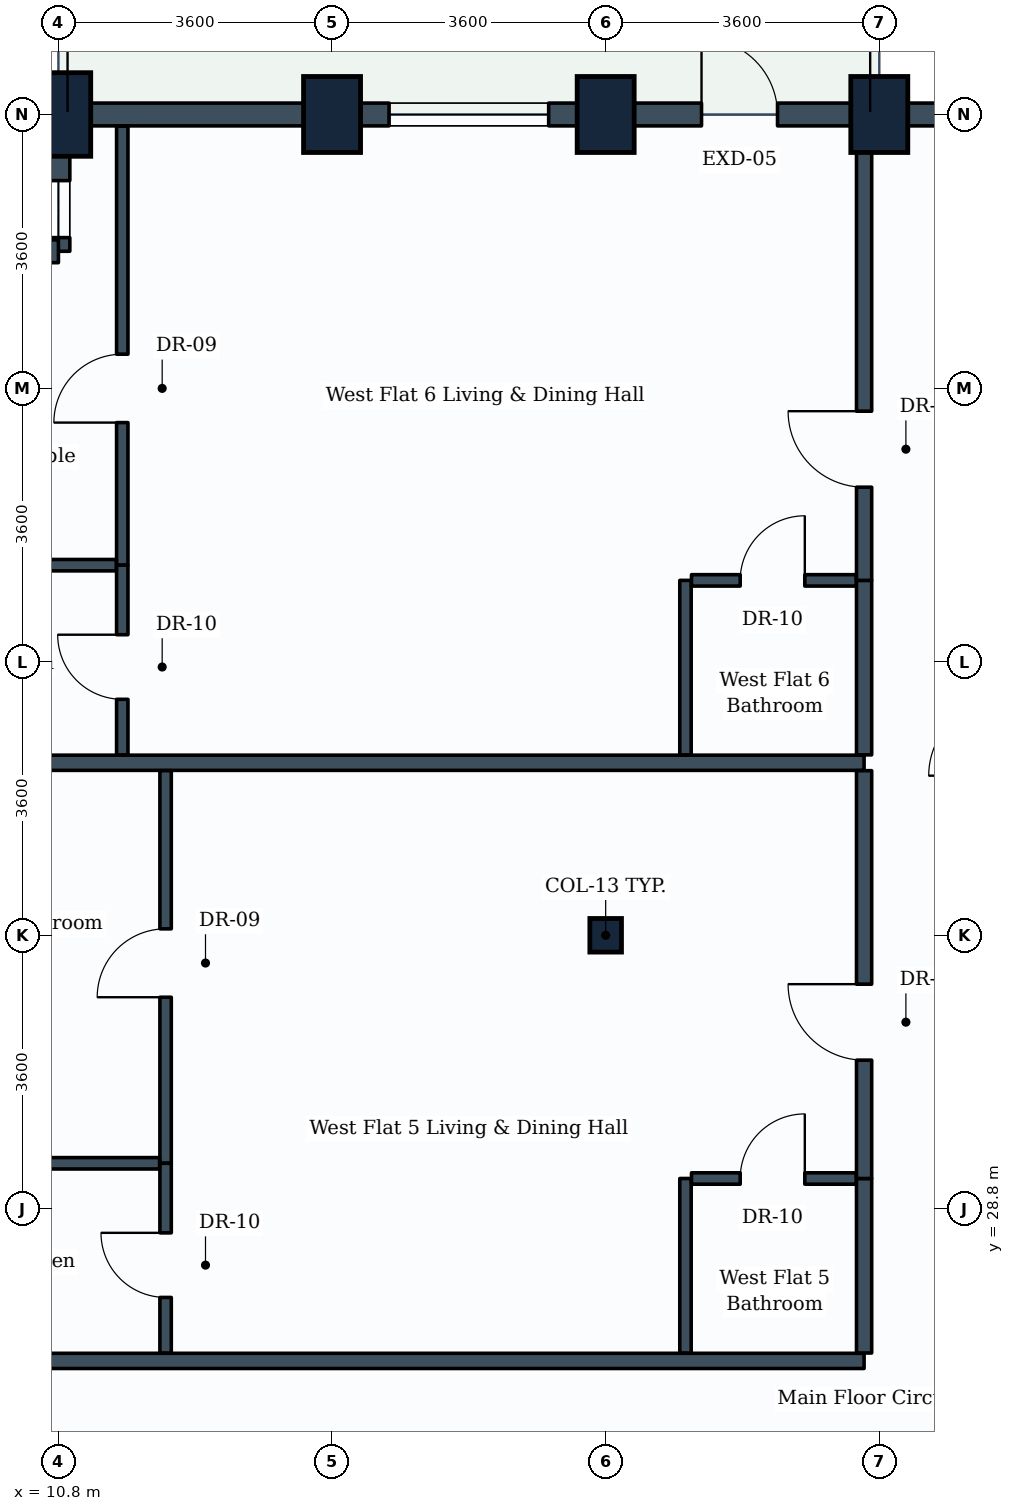
"""IFC4 building model, lengths in metres.
Left out: names, types, materials, properties, quantities, classifications, styles, units other than length and angle.
Written with IfcOpenShell. Run it as: python <this file> out.ifc"""

import sys

from ifc_helpers import new_model, si_unit, direction, frame, frame_2d, origin, origin_2d, place, context, subcontext, project, spatial, rectangle, i_section, extrude, element, fill, save


model = new_model("IFC4")
c1 = context("Model", 3, precision=1e-05, world=origin(), true_north=direction((0.0, 1.0)))
c2 = subcontext(c1, "Body", "Model", "MODEL_VIEW")
j1 = project(units=[si_unit("LENGTHUNIT", "METRE"), si_unit("PLANEANGLEUNIT", "RADIAN")], contexts=[c1])
p1 = place(None, origin())
s1 = spatial("IfcSite", under=j1, at=p1, CompositionType="ELEMENT")
p2 = place(p1, origin())
s2 = spatial("IfcBuilding", under=s1, at=p2, CompositionType="ELEMENT")
p3 = place(p2, frame((0.0, 0.0, 131.4)))
s3 = spatial("IfcBuildingStorey", under=s2, at=p3, CompositionType="ELEMENT", Elevation=131.4)
p4 = place(p3, frame((10.8, 43.2, 0.0), z_axis=(0.0, 0.0, 1.0), x_axis=(1.0, 0.0, 0.0)))
e1 = element("IfcColumn", 1, at=p4, inside=s3, PredefinedType="COLUMN", context=c2, shape_type="SweptSolid", body=[
    extrude(rectangle(XDim=0.85, YDim=1.1, at=origin_2d()), origin(), (0.0, 0.0, 1.0), 3.8),
])
p5 = place(p3, frame((14.4, 43.2, 0.0), z_axis=(0.0, 0.0, 1.0), x_axis=(1.0, 0.0, 0.0)))
e2 = element("IfcColumn", 2, at=p5, inside=s3, PredefinedType="COLUMN", context=c2, shape_type="SweptSolid", body=[
    extrude(rectangle(XDim=0.75, YDim=1.0, at=origin_2d()), origin(), (0.0, 0.0, 1.0), 3.8),
])
p6 = place(p3, frame((18.0, 32.4, 0.0), z_axis=(0.0, 0.0, 1.0), x_axis=(1.0, 0.0, 0.0)))
e3 = element("IfcColumn", 3, at=p6, inside=s3, PredefinedType="COLUMN", context=c2, shape_type="SweptSolid", body=[
    extrude(i_section(OverallWidth=0.416, OverallDepth=0.442, WebThickness=0.025, FlangeThickness=0.041, FilletRadius=0.015, at=origin_2d()), origin(), (0.0, 0.0, 1.0), 3.8),
])
for number, where, z_axis, x_axis in (
    (4, (18.0, 43.2, 0.0), (0.0, 0.0, 1.0), (1.0, 0.0, 0.0)),
    (5, (21.6, 43.2, 0.0), (0.0, 0.0, 1.0), (1.0, 0.0, 0.0)),
):
    element("IfcColumn", number, at=place(p3, frame(where, z_axis=z_axis, x_axis=x_axis)), inside=s3, PredefinedType="COLUMN", context=c2, shape_type="SweptSolid", body=[
        extrude(rectangle(XDim=0.75, YDim=1.0, at=origin_2d()), origin(), (0.0, 0.0, 1.0), 3.8),
    ])
p7 = place(p3, frame((21.6, 43.2, 0.0), z_axis=(0.0, 0.0, 1.0), x_axis=(1.0, 0.0, 0.0)))
e6 = element("IfcWall", 6, at=p7, inside=s3, PredefinedType="STANDARD", context=c2, shape_type="SweptSolid", body=[
    extrude(rectangle(XDim=3.6, YDim=0.3, at=frame_2d((1.8, 0.0))), origin(), (0.0, 0.0, 1.0), 2.93),
])
p8 = place(p3, frame((18.0, 43.2, 0.0), z_axis=(0.0, 0.0, 1.0), x_axis=(1.0, 0.0, 0.0)))
e7 = element("IfcWall", 7, at=p8, inside=s3, PredefinedType="STANDARD", context=c2, shape_type="SweptSolid", body=[
    extrude(rectangle(XDim=3.6, YDim=0.3, at=frame_2d((1.8, 0.0))), origin(), (0.0, 0.0, 1.0), 2.93),
])
p9 = place(p8, frame((1.261, 0.0, 0.0)))
e8 = element("IfcOpeningElement", 8, at=p9, cuts=e7, PredefinedType="OPENING", context=c2, shape_type="SweptSolid", body=[
    extrude(rectangle(XDim=1.0, YDim=2.1, at=frame_2d((0.5, 1.05))), frame((0.0, 0.16, 0.0), z_axis=(0.0, -1.0, 0.0), x_axis=(1.0, 0.0, 0.0)), (0.0, 0.0, 1.0), 0.32),
])
p10 = place(p3, frame((14.4, 43.2, 0.0), z_axis=(0.0, 0.0, 1.0), x_axis=(1.0, 0.0, 0.0)))
e9 = element("IfcWall", 9, at=p10, inside=s3, PredefinedType="STANDARD", context=c2, shape_type="SweptSolid", body=[
    extrude(rectangle(XDim=3.6, YDim=0.3, at=frame_2d((1.8, 0.0))), origin(), (0.0, 0.0, 1.0), 2.93),
])
p11 = place(p10, frame((0.75, 0.0, 0.85)))
e10 = element("IfcOpeningElement", 10, at=p11, cuts=e9, PredefinedType="OPENING", context=c2, shape_type="SweptSolid", body=[
    extrude(rectangle(XDim=2.1, YDim=1.35, at=frame_2d((1.05, 0.675))), frame((0.0, 0.16, 0.0), z_axis=(0.0, -1.0, 0.0), x_axis=(1.0, 0.0, 0.0)), (0.0, 0.0, 1.0), 0.32),
])
p12 = place(p3, frame((10.8, 43.2, 0.0), z_axis=(0.0, 0.0, 1.0), x_axis=(1.0, 0.0, 0.0)))
e11 = element("IfcWall", 11, at=p12, inside=s3, PredefinedType="STANDARD", context=c2, shape_type="SweptSolid", body=[
    extrude(rectangle(XDim=3.6, YDim=0.3, at=frame_2d((1.8, 0.0))), origin(), (0.0, 0.0, 1.0), 2.93),
])
p13 = place(p3, frame((10.8, 41.4, 0.0), z_axis=(0.0, 0.0, 1.0), x_axis=(0.0, 1.0, 0.0)))
e12 = element("IfcWall", 12, at=p13, inside=s3, PredefinedType="STANDARD", context=c2, shape_type="SweptSolid", body=[
    extrude(rectangle(XDim=1.8, YDim=0.3, at=frame_2d((0.9, 0.0))), origin(), (0.0, 0.0, 1.0), 2.93),
])
p14 = place(p13, frame((0.18, 0.0, 0.85)))
e13 = element("IfcOpeningElement", 13, at=p14, cuts=e12, PredefinedType="OPENING", context=c2, shape_type="SweptSolid", body=[
    extrude(rectangle(XDim=0.75, YDim=1.05, at=frame_2d((0.375, 0.525))), frame((0.0, 0.16, 0.0), z_axis=(0.0, -1.0, 0.0), x_axis=(1.0, 0.0, 0.0)), (0.0, 0.0, 1.0), 0.32),
])
p15 = place(p3, frame((9.0, 41.4, 0.0), z_axis=(0.0, 0.0, 1.0), x_axis=(1.0, 0.0, 0.0)))
e14 = element("IfcWall", 14, at=p15, inside=s3, PredefinedType="STANDARD", context=c2, shape_type="SweptSolid", body=[
    extrude(rectangle(XDim=1.8, YDim=0.3, at=frame_2d((0.9, 0.0))), origin(), (0.0, 0.0, 1.0), 3.535),
])
for number, where, z_axis, x_axis in (
    (15, (7.354, 26.8, 0.0), (0.0, 0.0, 1.0), (1.0, 0.0, 0.0)),
    (16, (7.354, 34.67, 0.0), (0.0, 0.0, 1.0), (1.0, 0.0, 0.0)),
):
    element("IfcWall", number, at=place(p3, frame(where, z_axis=z_axis, x_axis=x_axis)), inside=s3, PredefinedType="PARTITIONING", context=c2, shape_type="SweptSolid", body=[
        extrude(rectangle(XDim=14.046, YDim=0.2, at=frame_2d((7.023, 0.0))), origin(), (0.0, 0.0, 1.0), 2.93),
    ])
p16 = place(p3, frame((21.4, 26.904, 0.0), z_axis=(0.0, 0.0, 1.0), x_axis=(0.0, 1.0, 0.0)))
e17 = element("IfcWall", 17, at=p16, inside=s3, PredefinedType="PARTITIONING", context=c2, shape_type="SweptSolid", body=[
    extrude(rectangle(XDim=2.296, YDim=0.2, at=frame_2d((1.148, 0.0))), origin(), (0.0, 0.0, 1.0), 3.13),
])
p17 = place(p3, frame((19.05, 26.904, 0.0), z_axis=(0.0, 0.0, 1.0), x_axis=(0.0, 1.0, 0.0)))
e18 = element("IfcWall", 18, at=p17, inside=s3, PredefinedType="PARTITIONING", context=c2, shape_type="SweptSolid", body=[
    extrude(rectangle(XDim=2.296, YDim=0.15, at=frame_2d((1.148, 0.0))), origin(), (0.0, 0.0, 1.0), 3.17),
])
p18 = place(p3, frame((19.129, 29.2, 0.0), z_axis=(0.0, 0.0, 1.0), x_axis=(1.0, 0.0, 0.0)))
e19 = element("IfcWall", 19, at=p18, inside=s3, PredefinedType="PARTITIONING", context=c2, shape_type="SweptSolid", body=[
    extrude(rectangle(XDim=2.167, YDim=0.15, at=frame_2d((1.083, 0.0))), origin(), (0.0, 0.0, 1.0), 3.535),
])
p19 = place(p18, frame((0.641, 0.0, 0.0)))
e20 = element("IfcOpeningElement", 20, at=p19, cuts=e19, PredefinedType="OPENING", context=c2, shape_type="SweptSolid", body=[
    extrude(rectangle(XDim=0.85, YDim=2.1, at=frame_2d((0.425, 1.05))), frame((0.0, 0.085, 0.0), z_axis=(0.0, -1.0, 0.0), x_axis=(1.0, 0.0, 0.0)), (0.0, 0.0, 1.0), 0.17),
])
p20 = place(p3, frame((21.4, 29.2, 0.0), z_axis=(0.0, 0.0, 1.0), x_axis=(0.0, 1.0, 0.0)))
e21 = element("IfcWall", 21, at=p20, inside=s3, PredefinedType="PARTITIONING", context=c2, shape_type="SweptSolid", body=[
    extrude(rectangle(XDim=5.366, YDim=0.2, at=frame_2d((2.683, 0.0))), origin(), (0.0, 0.0, 1.0), 3.13),
])
p21 = place(p20, frame((1.557, 0.0, 0.0)))
e22 = element("IfcOpeningElement", 22, at=p21, cuts=e21, PredefinedType="OPENING", context=c2, shape_type="SweptSolid", body=[
    extrude(rectangle(XDim=1.0, YDim=2.1, at=frame_2d((0.5, 1.05))), frame((0.0, 0.11, 0.0), z_axis=(0.0, -1.0, 0.0), x_axis=(1.0, 0.0, 0.0)), (0.0, 0.0, 1.0), 0.22),
])
p22 = place(p3, frame((12.21, 29.4, 0.0), z_axis=(0.0, 0.0, 1.0), x_axis=(0.0, 1.0, 0.0)))
e23 = element("IfcWall", 23, at=p22, inside=s3, PredefinedType="PARTITIONING", context=c2, shape_type="SweptSolid", body=[
    extrude(rectangle(XDim=5.166, YDim=0.15, at=frame_2d((2.583, 0.0))), origin(), (0.0, 0.0, 1.0), 3.18),
])
p23 = place(p22, frame((2.185, 0.0, 0.0)))
e24 = element("IfcOpeningElement", 24, at=p23, cuts=e23, PredefinedType="OPENING", context=c2, shape_type="SweptSolid", body=[
    extrude(rectangle(XDim=0.9, YDim=2.1, at=frame_2d((0.45, 1.05))), frame((0.0, 0.085, 0.0), z_axis=(0.0, -1.0, 0.0), x_axis=(1.0, 0.0, 0.0)), (0.0, 0.0, 1.0), 0.17),
])
p24 = place(p3, frame((12.21, 26.904, 0.0), z_axis=(0.0, 0.0, 1.0), x_axis=(0.0, 1.0, 0.0)))
e25 = element("IfcWall", 25, at=p24, inside=s3, PredefinedType="PARTITIONING", context=c2, shape_type="SweptSolid", body=[
    extrude(rectangle(XDim=2.496, YDim=0.15, at=frame_2d((1.248, 0.0))), origin(), (0.0, 0.0, 1.0), 3.17),
])
p25 = place(p24, frame((0.731, 0.0, 0.0)))
e26 = element("IfcOpeningElement", 26, at=p25, cuts=e25, PredefinedType="OPENING", context=c2, shape_type="SweptSolid", body=[
    extrude(rectangle(XDim=0.85, YDim=2.1, at=frame_2d((0.425, 1.05))), frame((0.0, 0.085, 0.0), z_axis=(0.0, -1.0, 0.0), x_axis=(1.0, 0.0, 0.0)), (0.0, 0.0, 1.0), 0.17),
])
p26 = place(p3, frame((7.354, 29.4, 0.0), z_axis=(0.0, 0.0, 1.0), x_axis=(1.0, 0.0, 0.0)))
e27 = element("IfcWall", 27, at=p26, inside=s3, PredefinedType="PARTITIONING", context=c2, shape_type="SweptSolid", body=[
    extrude(rectangle(XDim=4.777, YDim=0.15, at=frame_2d((2.389, 0.0))), origin(), (0.0, 0.0, 1.0), 2.93),
])
p27 = place(p3, frame((21.4, 34.774, 0.0), z_axis=(0.0, 0.0, 1.0), x_axis=(0.0, 1.0, 0.0)))
e28 = element("IfcWall", 28, at=p27, inside=s3, PredefinedType="PARTITIONING", context=c2, shape_type="SweptSolid", body=[
    extrude(rectangle(XDim=2.296, YDim=0.2, at=frame_2d((1.148, 0.0))), origin(), (0.0, 0.0, 1.0), 3.17),
])
p28 = place(p3, frame((19.05, 34.774, 0.0), z_axis=(0.0, 0.0, 1.0), x_axis=(0.0, 1.0, 0.0)))
e29 = element("IfcWall", 29, at=p28, inside=s3, PredefinedType="PARTITIONING", context=c2, shape_type="SweptSolid", body=[
    extrude(rectangle(XDim=2.296, YDim=0.15, at=frame_2d((1.148, 0.0))), origin(), (0.0, 0.0, 1.0), 3.17),
])
p29 = place(p3, frame((19.129, 37.07, 0.0), z_axis=(0.0, 0.0, 1.0), x_axis=(1.0, 0.0, 0.0)))
e30 = element("IfcWall", 30, at=p29, inside=s3, PredefinedType="PARTITIONING", context=c2, shape_type="SweptSolid", body=[
    extrude(rectangle(XDim=2.167, YDim=0.15, at=frame_2d((1.083, 0.0))), origin(), (0.0, 0.0, 1.0), 3.535),
])
p30 = place(p29, frame((0.641, 0.0, 0.0)))
e31 = element("IfcOpeningElement", 31, at=p30, cuts=e30, PredefinedType="OPENING", context=c2, shape_type="SweptSolid", body=[
    extrude(rectangle(XDim=0.85, YDim=2.1, at=frame_2d((0.425, 1.05))), frame((0.0, 0.085, 0.0), z_axis=(0.0, -1.0, 0.0), x_axis=(1.0, 0.0, 0.0)), (0.0, 0.0, 1.0), 0.17),
])
p31 = place(p3, frame((21.4, 37.07, 0.0), z_axis=(0.0, 0.0, 1.0), x_axis=(0.0, 1.0, 0.0)))
e32 = element("IfcWall", 32, at=p31, inside=s3, PredefinedType="PARTITIONING", context=c2, shape_type="SweptSolid", body=[
    extrude(rectangle(XDim=5.976, YDim=0.2, at=frame_2d((2.988, 0.0))), origin(), (0.0, 0.0, 1.0), 2.93),
])
p32 = place(p31, frame((1.226, 0.0, 0.0)))
e33 = element("IfcOpeningElement", 33, at=p32, cuts=e32, PredefinedType="OPENING", context=c2, shape_type="SweptSolid", body=[
    extrude(rectangle(XDim=1.0, YDim=2.1, at=frame_2d((0.5, 1.05))), frame((0.0, 0.11, 0.0), z_axis=(0.0, -1.0, 0.0), x_axis=(1.0, 0.0, 0.0)), (0.0, 0.0, 1.0), 0.22),
])
p33 = place(p3, frame((11.64, 37.27, 0.0), z_axis=(0.0, 0.0, 1.0), x_axis=(0.0, 1.0, 0.0)))
e34 = element("IfcWall", 34, at=p33, inside=s3, PredefinedType="PARTITIONING", context=c2, shape_type="SweptSolid", body=[
    extrude(rectangle(XDim=5.776, YDim=0.15, at=frame_2d((2.888, 0.0))), origin(), (0.0, 0.0, 1.0), 2.93),
])
p34 = place(p33, frame((1.876, 0.0, 0.0)))
e35 = element("IfcOpeningElement", 35, at=p34, cuts=e34, PredefinedType="OPENING", context=c2, shape_type="SweptSolid", body=[
    extrude(rectangle(XDim=0.9, YDim=2.1, at=frame_2d((0.45, 1.05))), frame((0.0, 0.085, 0.0), z_axis=(0.0, -1.0, 0.0), x_axis=(1.0, 0.0, 0.0)), (0.0, 0.0, 1.0), 0.17),
])
p35 = place(p3, frame((11.64, 34.774, 0.0), z_axis=(0.0, 0.0, 1.0), x_axis=(0.0, 1.0, 0.0)))
e36 = element("IfcWall", 36, at=p35, inside=s3, PredefinedType="PARTITIONING", context=c2, shape_type="SweptSolid", body=[
    extrude(rectangle(XDim=2.496, YDim=0.15, at=frame_2d((1.248, 0.0))), origin(), (0.0, 0.0, 1.0), 3.17),
])
p36 = place(p35, frame((0.731, 0.0, 0.0)))
e37 = element("IfcOpeningElement", 37, at=p36, cuts=e36, PredefinedType="OPENING", context=c2, shape_type="SweptSolid", body=[
    extrude(rectangle(XDim=0.85, YDim=2.1, at=frame_2d((0.425, 1.05))), frame((0.0, 0.085, 0.0), z_axis=(0.0, -1.0, 0.0), x_axis=(1.0, 0.0, 0.0)), (0.0, 0.0, 1.0), 0.17),
])
p37 = place(p3, frame((7.354, 37.27, 0.0), z_axis=(0.0, 0.0, 1.0), x_axis=(1.0, 0.0, 0.0)))
e38 = element("IfcWall", 38, at=p37, inside=s3, PredefinedType="PARTITIONING", context=c2, shape_type="SweptSolid", body=[
    extrude(rectangle(XDim=4.207, YDim=0.15, at=frame_2d((2.104, 0.0))), origin(), (0.0, 0.0, 1.0), 2.93),
])
p38 = place(p9, origin())
e39 = element("IfcDoor", 39, at=p38, inside=s3, OperationType="SINGLE_SWING_LEFT", PredefinedType="DOOR", context=c2, shape_type="SweptSolid", body=[
    extrude(rectangle(XDim=1.0, YDim=2.1, at=frame_2d((0.5, 1.05))), frame((0.0, 0.025, 0.0), z_axis=(0.0, -1.0, 0.0), x_axis=(1.0, 0.0, 0.0)), (0.0, 0.0, 1.0), 0.05),
])
fill(e8, e39)
p39 = place(p11, origin())
e40 = element("IfcWindow", 40, at=p39, inside=s3, PartitioningType="SINGLE_PANEL", PredefinedType="WINDOW", context=c2, shape_type="SweptSolid", body=[
    extrude(rectangle(XDim=2.1, YDim=1.35, at=frame_2d((1.05, 0.675))), frame((0.0, 0.03, 0.0), z_axis=(0.0, -1.0, 0.0), x_axis=(1.0, 0.0, 0.0)), (0.0, 0.0, 1.0), 0.06),
])
fill(e10, e40)
p40 = place(p19, origin())
e41 = element("IfcDoor", 41, at=p40, inside=s3, OperationType="SINGLE_SWING_RIGHT", PredefinedType="DOOR", context=c2, shape_type="SweptSolid", body=[
    extrude(rectangle(XDim=0.85, YDim=2.1, at=frame_2d((0.425, 1.05))), frame((0.0, 0.025, 0.0), z_axis=(0.0, -1.0, 0.0), x_axis=(1.0, 0.0, 0.0)), (0.0, 0.0, 1.0), 0.05),
])
fill(e20, e41)
p41 = place(p21, origin())
e42 = element("IfcDoor", 42, at=p41, inside=s3, OperationType="SINGLE_SWING_RIGHT", PredefinedType="DOOR", context=c2, shape_type="SweptSolid", body=[
    extrude(rectangle(XDim=1.0, YDim=2.1, at=frame_2d((0.5, 1.05))), frame((0.0, 0.025, 0.0), z_axis=(0.0, -1.0, 0.0), x_axis=(1.0, 0.0, 0.0)), (0.0, 0.0, 1.0), 0.05),
])
fill(e22, e42)
p42 = place(p23, origin())
e43 = element("IfcDoor", 43, at=p42, inside=s3, OperationType="SINGLE_SWING_LEFT", PredefinedType="DOOR", context=c2, shape_type="SweptSolid", body=[
    extrude(rectangle(XDim=0.9, YDim=2.1, at=frame_2d((0.45, 1.05))), frame((0.0, 0.025, 0.0), z_axis=(0.0, -1.0, 0.0), x_axis=(1.0, 0.0, 0.0)), (0.0, 0.0, 1.0), 0.05),
])
fill(e24, e43)
p43 = place(p25, origin())
e44 = element("IfcDoor", 44, at=p43, inside=s3, OperationType="SINGLE_SWING_RIGHT", PredefinedType="DOOR", context=c2, shape_type="SweptSolid", body=[
    extrude(rectangle(XDim=0.85, YDim=2.1, at=frame_2d((0.425, 1.05))), frame((0.0, 0.025, 0.0), z_axis=(0.0, -1.0, 0.0), x_axis=(1.0, 0.0, 0.0)), (0.0, 0.0, 1.0), 0.05),
])
fill(e26, e44)
p44 = place(p30, origin())
e45 = element("IfcDoor", 45, at=p44, inside=s3, OperationType="SINGLE_SWING_RIGHT", PredefinedType="DOOR", context=c2, shape_type="SweptSolid", body=[
    extrude(rectangle(XDim=0.85, YDim=2.1, at=frame_2d((0.425, 1.05))), frame((0.0, 0.025, 0.0), z_axis=(0.0, -1.0, 0.0), x_axis=(1.0, 0.0, 0.0)), (0.0, 0.0, 1.0), 0.05),
])
fill(e31, e45)
p45 = place(p32, origin())
e46 = element("IfcDoor", 46, at=p45, inside=s3, OperationType="SINGLE_SWING_RIGHT", PredefinedType="DOOR", context=c2, shape_type="SweptSolid", body=[
    extrude(rectangle(XDim=1.0, YDim=2.1, at=frame_2d((0.5, 1.05))), frame((0.0, 0.025, 0.0), z_axis=(0.0, -1.0, 0.0), x_axis=(1.0, 0.0, 0.0)), (0.0, 0.0, 1.0), 0.05),
])
fill(e33, e46)
p46 = place(p34, origin())
e47 = element("IfcDoor", 47, at=p46, inside=s3, OperationType="SINGLE_SWING_LEFT", PredefinedType="DOOR", context=c2, shape_type="SweptSolid", body=[
    extrude(rectangle(XDim=0.9, YDim=2.1, at=frame_2d((0.45, 1.05))), frame((0.0, 0.025, 0.0), z_axis=(0.0, -1.0, 0.0), x_axis=(1.0, 0.0, 0.0)), (0.0, 0.0, 1.0), 0.05),
])
fill(e35, e47)
p47 = place(p36, origin())
e48 = element("IfcDoor", 48, at=p47, inside=s3, OperationType="SINGLE_SWING_RIGHT", PredefinedType="DOOR", context=c2, shape_type="SweptSolid", body=[
    extrude(rectangle(XDim=0.85, YDim=2.1, at=frame_2d((0.425, 1.05))), frame((0.0, 0.025, 0.0), z_axis=(0.0, -1.0, 0.0), x_axis=(1.0, 0.0, 0.0)), (0.0, 0.0, 1.0), 0.05),
])
fill(e37, e48)
p48 = place(p14, origin())
e49 = element("IfcWindow", 49, at=p48, inside=s3, PartitioningType="SINGLE_PANEL", PredefinedType="WINDOW", context=c2, shape_type="SweptSolid", body=[
    extrude(rectangle(XDim=0.75, YDim=1.05, at=frame_2d((0.375, 0.525))), frame((0.0, 0.03, 0.0), z_axis=(0.0, -1.0, 0.0), x_axis=(1.0, 0.0, 0.0)), (0.0, 0.0, 1.0), 0.06),
])
fill(e13, e49)
save(model, sys.argv[1])
